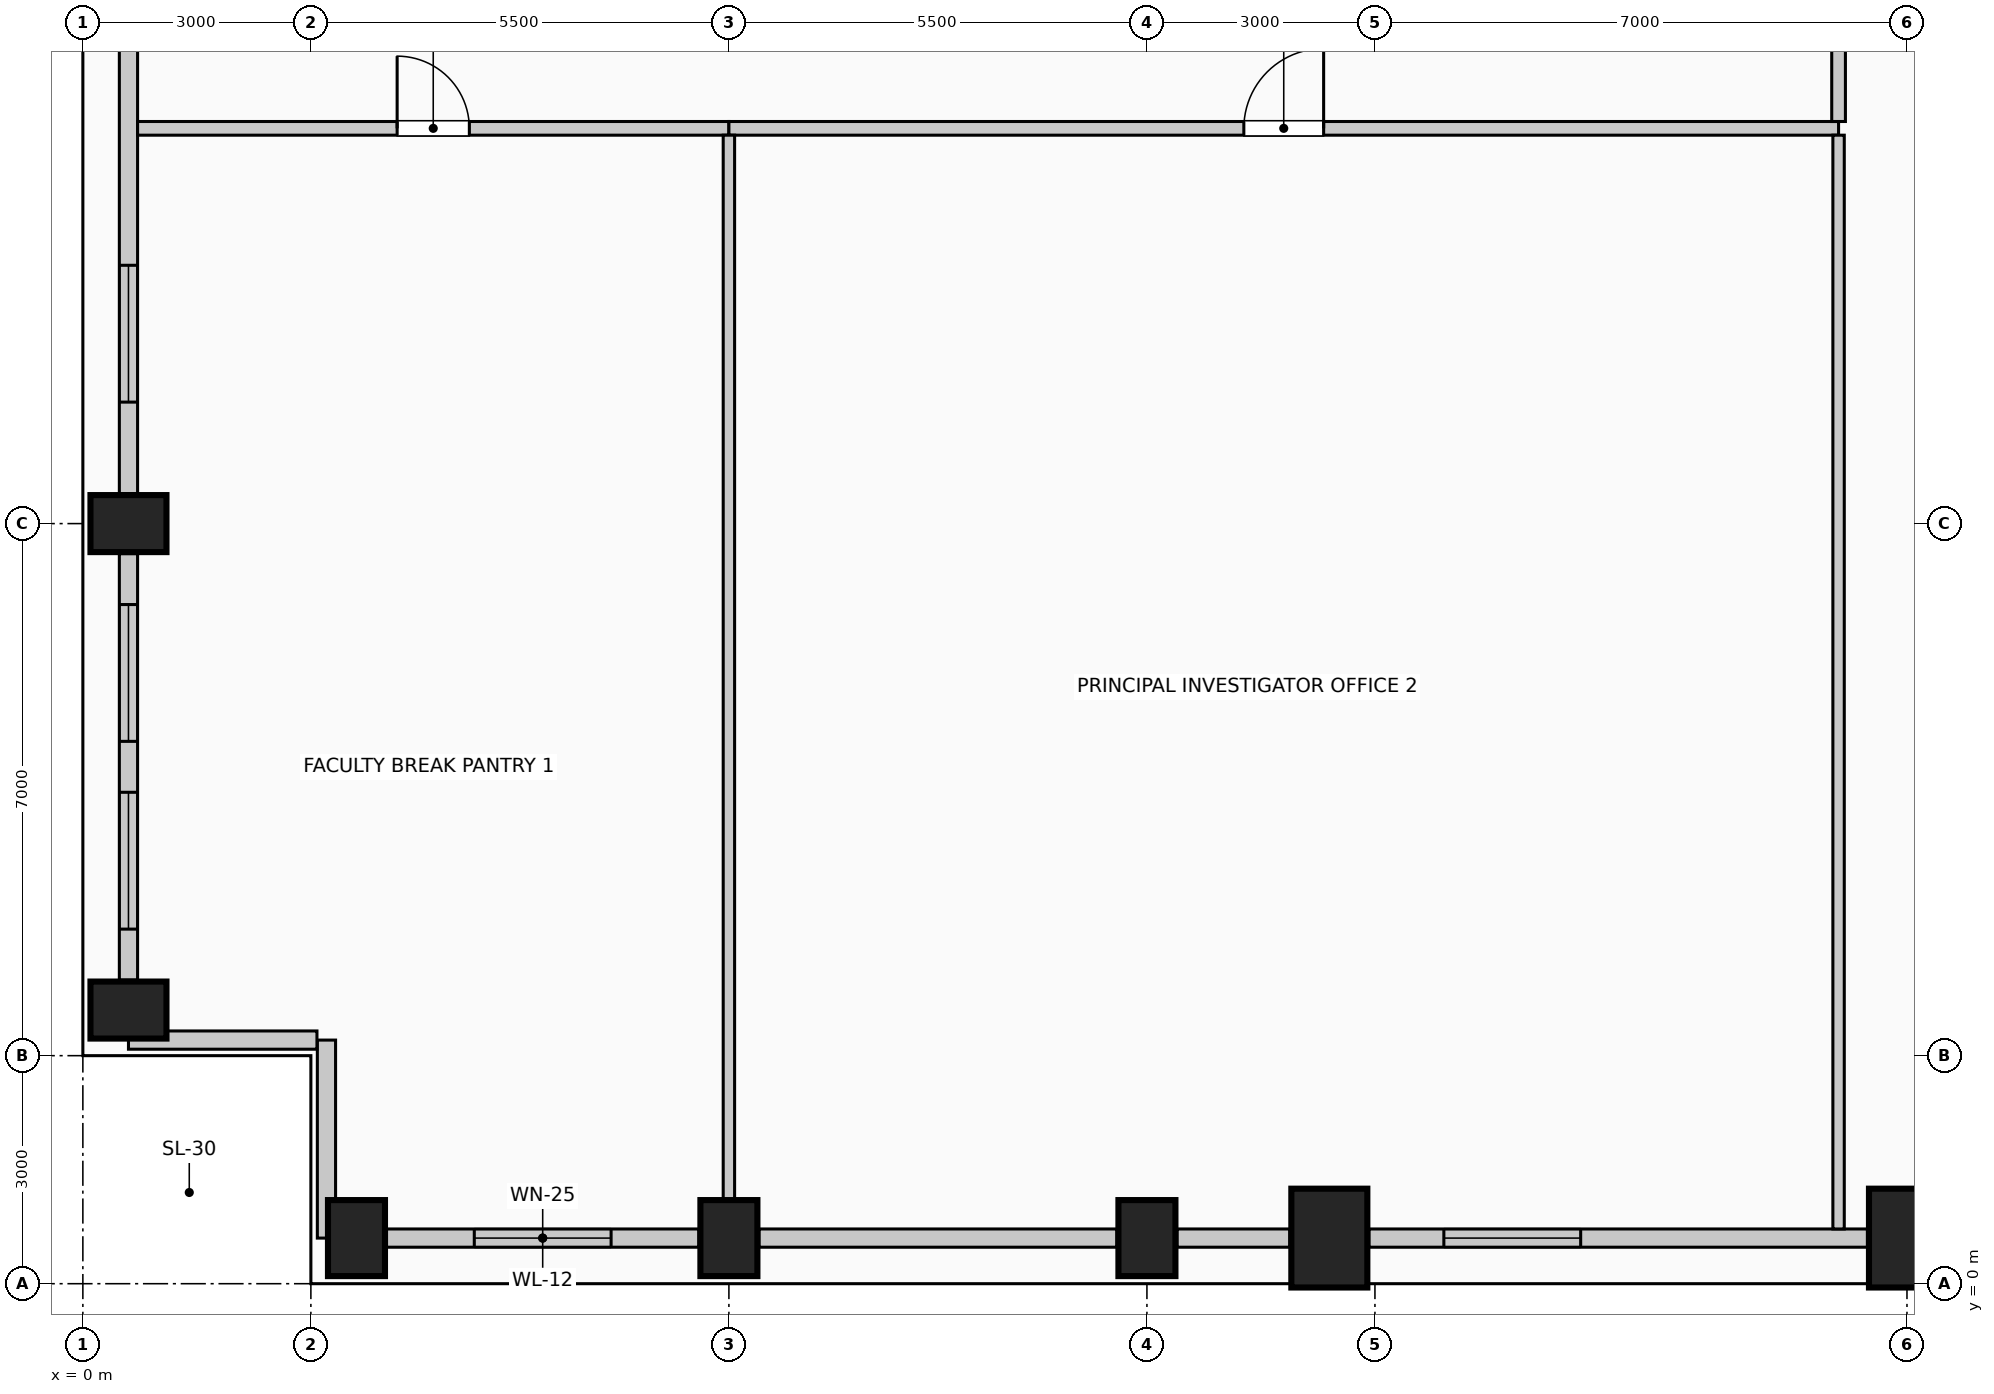
"""IFC4 building model, lengths in metres.
Left out: names, types, materials, properties, quantities, classifications, styles, units other than length and angle.
Written with IfcOpenShell. Run it as: python <this file> out.ifc"""

import sys

from ifc_helpers import new_model, si_unit, direction, frame, frame_2d, origin, origin_2d, place, context, subcontext, project, spatial, rectangle, extrude, element, fill, save


model = new_model("IFC4")
c1 = context("Model", 3, precision=1e-05, world=origin(), true_north=direction((0.0, 1.0)))
c2 = subcontext(c1, "Body", "Model", "MODEL_VIEW")
j1 = project(units=[si_unit("LENGTHUNIT", "METRE"), si_unit("PLANEANGLEUNIT", "RADIAN")], contexts=[c1])
p1 = place(None, origin())
s1 = spatial("IfcSite", under=j1, at=p1, CompositionType="ELEMENT")
p2 = place(p1, origin())
s2 = spatial("IfcBuilding", under=s1, at=p2, CompositionType="ELEMENT")
p3 = place(p2, frame((0.0, 0.0, 222.6)))
s3 = spatial("IfcBuildingStorey", under=s2, at=p3, CompositionType="ELEMENT", Elevation=222.6)
for number, where, z_axis, x_axis in (
    (1, (3.6, 0.6, 0.0), (0.0, 0.0, 1.0), (1.0, 0.0, 0.0)),
    (2, (8.5, 0.6, 0.0), (0.0, 0.0, 1.0), (1.0, 0.0, 0.0)),
    (3, (14.0, 0.6, 0.0), (0.0, 0.0, 1.0), (1.0, 0.0, 0.0)),
):
    element("IfcColumn", number, at=place(p3, frame(where, z_axis=z_axis, x_axis=x_axis)), inside=s3, PredefinedType="COLUMN", context=c2, shape_type="SweptSolid", body=[
        extrude(rectangle(XDim=0.75, YDim=1.0, at=origin_2d()), origin(), (0.0, 0.0, 1.0), 4.0),
    ])
for number, where, z_axis, x_axis in (
    (4, (16.4, 0.6, 0.0), (0.0, 0.0, 1.0), (1.0, 0.0, 0.0)),
    (5, (24.0, 0.6, 0.0), (0.0, 0.0, 1.0), (1.0, 0.0, 0.0)),
):
    element("IfcColumn", number, at=place(p3, frame(where, z_axis=z_axis, x_axis=x_axis)), inside=s3, PredefinedType="COLUMN", context=c2, shape_type="SweptSolid", body=[
        extrude(rectangle(XDim=1.0, YDim=1.3, at=origin_2d()), origin(), (0.0, 0.0, 1.0), 4.0),
    ])
for number, where, z_axis, x_axis in (
    (6, (0.6, 3.6, 0.0), (0.0, 0.0, 1.0), (0.0, 1.0, 0.0)),
    (7, (0.6, 10.0, 0.0), (0.0, 0.0, 1.0), (0.0, 1.0, 0.0)),
):
    element("IfcColumn", number, at=place(p3, frame(where, z_axis=z_axis, x_axis=x_axis)), inside=s3, PredefinedType="COLUMN", context=c2, shape_type="SweptSolid", body=[
        extrude(rectangle(XDim=0.75, YDim=1.0, at=origin_2d()), origin(), (0.0, 0.0, 1.0), 4.0),
    ])
p4 = place(p3, frame((8.105, 0.6, 0.0), z_axis=(0.0, 0.0, 1.0), x_axis=(-1.0, 0.0, 0.0)))
e8 = element("IfcWall", 8, at=p4, inside=s3, PredefinedType="SOLIDWALL", context=c2, shape_type="SweptSolid", body=[
    extrude(rectangle(XDim=4.11, YDim=0.24, at=frame_2d((2.055, 0.0))), origin(), (0.0, 0.0, 1.0), 3.0),
])
p5 = place(p4, frame((1.155, 0.0, 0.42)))
e9 = element("IfcOpeningElement", 9, at=p5, cuts=e8, PredefinedType="OPENING", context=c2, shape_type="SweptSolid", body=[
    extrude(rectangle(XDim=1.8, YDim=2.2, at=frame_2d((0.9, 1.1))), frame((0.0, 0.13, 0.0), z_axis=(0.0, -1.0, 0.0), x_axis=(1.0, 0.0, 0.0)), (0.0, 0.0, 1.0), 0.26),
])
p6 = place(p3, frame((13.605, 0.6, 0.0), z_axis=(0.0, 0.0, 1.0), x_axis=(-1.0, 0.0, 0.0)))
e10 = element("IfcWall", 10, at=p6, inside=s3, PredefinedType="SOLIDWALL", context=c2, shape_type="SweptSolid", body=[
    extrude(rectangle(XDim=4.71, YDim=0.24, at=frame_2d((2.355, 0.0))), origin(), (0.0, 0.0, 1.0), 3.0),
])
p7 = place(p3, frame((15.88, 0.6, 0.0), z_axis=(0.0, 0.0, 1.0), x_axis=(-1.0, 0.0, 0.0)))
e11 = element("IfcWall", 11, at=p7, inside=s3, PredefinedType="SOLIDWALL", context=c2, shape_type="SweptSolid", body=[
    extrude(rectangle(XDim=1.485, YDim=0.24, at=frame_2d((0.742, 0.0))), origin(), (0.0, 0.0, 1.0), 3.0),
])
p8 = place(p3, frame((23.48, 0.6, 0.0), z_axis=(0.0, 0.0, 1.0), x_axis=(-1.0, 0.0, 0.0)))
e12 = element("IfcWall", 12, at=p8, inside=s3, PredefinedType="SOLIDWALL", context=c2, shape_type="SweptSolid", body=[
    extrude(rectangle(XDim=6.56, YDim=0.24, at=frame_2d((3.28, 0.0))), origin(), (0.0, 0.0, 1.0), 3.0),
])
p9 = place(p8, frame((3.773, 0.0, 0.42)))
e13 = element("IfcOpeningElement", 13, at=p9, cuts=e12, PredefinedType="OPENING", context=c2, shape_type="SweptSolid", body=[
    extrude(rectangle(XDim=1.8, YDim=2.2, at=frame_2d((0.9, 1.1))), frame((0.0, 0.13, 0.0), z_axis=(0.0, -1.0, 0.0), x_axis=(1.0, 0.0, 0.0)), (0.0, 0.0, 1.0), 0.26),
])
p10 = place(p3, frame((0.6, 3.995, 0.0), z_axis=(0.0, 0.0, 1.0), x_axis=(0.0, 1.0, 0.0)))
e14 = element("IfcWall", 14, at=p10, inside=s3, PredefinedType="SOLIDWALL", context=c2, shape_type="SweptSolid", body=[
    extrude(rectangle(XDim=5.61, YDim=0.24, at=frame_2d((2.805, 0.0))), origin(), (0.0, 0.0, 1.0), 3.0),
])
p11 = place(p10, frame((0.67, 0.0, 0.42)))
e15 = element("IfcOpeningElement", 15, at=p11, cuts=e14, PredefinedType="OPENING", context=c2, shape_type="SweptSolid", body=[
    extrude(rectangle(XDim=1.8, YDim=2.2, at=frame_2d((0.9, 1.1))), frame((0.0, 0.13, 0.0), z_axis=(0.0, -1.0, 0.0), x_axis=(1.0, 0.0, 0.0)), (0.0, 0.0, 1.0), 0.26),
])
p12 = place(p10, frame((3.14, 0.0, 0.42)))
e16 = element("IfcOpeningElement", 16, at=p12, cuts=e14, PredefinedType="OPENING", context=c2, shape_type="SweptSolid", body=[
    extrude(rectangle(XDim=1.8, YDim=2.2, at=frame_2d((0.9, 1.1))), frame((0.0, 0.13, 0.0), z_axis=(0.0, -1.0, 0.0), x_axis=(1.0, 0.0, 0.0)), (0.0, 0.0, 1.0), 0.26),
])
p13 = place(p3, frame((0.6, 10.395, 0.0), z_axis=(0.0, 0.0, 1.0), x_axis=(0.0, 1.0, 0.0)))
e17 = element("IfcWall", 17, at=p13, inside=s3, PredefinedType="SOLIDWALL", context=c2, shape_type="SweptSolid", body=[
    extrude(rectangle(XDim=7.21, YDim=0.24, at=frame_2d((3.605, 0.0))), origin(), (0.0, 0.0, 1.0), 3.0),
])
p14 = place(p13, frame((1.203, 0.0, 0.42)))
e18 = element("IfcOpeningElement", 18, at=p14, cuts=e17, PredefinedType="OPENING", context=c2, shape_type="SweptSolid", body=[
    extrude(rectangle(XDim=1.8, YDim=2.2, at=frame_2d((0.9, 1.1))), frame((0.0, 0.13, 0.0), z_axis=(0.0, -1.0, 0.0), x_axis=(1.0, 0.0, 0.0)), (0.0, 0.0, 1.0), 0.26),
])
p15 = place(p3, frame((3.205, 0.6, 0.0), z_axis=(0.0, 0.0, 1.0), x_axis=(0.0, 1.0, 0.0)))
e19 = element("IfcWall", 19, at=p15, inside=s3, PredefinedType="SOLIDWALL", context=c2, shape_type="SweptSolid", body=[
    extrude(rectangle(XDim=2.605, YDim=0.24, at=frame_2d((1.302, 0.0))), origin(), (0.0, 0.0, 1.0), 3.75),
])
p16 = place(p3, frame((3.08, 3.205, 0.0), z_axis=(0.0, 0.0, 1.0), x_axis=(-1.0, 0.0, 0.0)))
e20 = element("IfcWall", 20, at=p16, inside=s3, PredefinedType="SOLIDWALL", context=c2, shape_type="SweptSolid", body=[
    extrude(rectangle(XDim=2.48, YDim=0.24, at=frame_2d((1.24, 0.0))), origin(), (0.0, 0.0, 1.0), 3.75),
])
p17 = place(p3, frame((0.72, 15.2, 0.0), z_axis=(0.0, 0.0, 1.0), x_axis=(1.0, 0.0, 0.0)))
e21 = element("IfcWall", 21, at=p17, inside=s3, PredefinedType="PARTITIONING", context=c2, shape_type="SweptSolid", body=[
    extrude(rectangle(XDim=7.78, YDim=0.18, at=frame_2d((3.89, 0.0))), origin(), (0.0, 0.0, 1.0), 3.75),
])
p18 = place(p17, frame((3.415, 0.0, 0.0)))
e22 = element("IfcOpeningElement", 22, at=p18, cuts=e21, PredefinedType="OPENING", context=c2, shape_type="SweptSolid", body=[
    extrude(rectangle(XDim=0.95, YDim=2.15, at=frame_2d((0.475, 1.075))), frame((0.0, 0.1, 0.0), z_axis=(0.0, -1.0, 0.0), x_axis=(1.0, 0.0, 0.0)), (0.0, 0.0, 1.0), 0.2),
])
p19 = place(p3, frame((8.5, 15.2, 0.0), z_axis=(0.0, 0.0, 1.0), x_axis=(1.0, 0.0, 0.0)))
e23 = element("IfcWall", 23, at=p19, inside=s3, PredefinedType="PARTITIONING", context=c2, shape_type="SweptSolid", body=[
    extrude(rectangle(XDim=14.6, YDim=0.18, at=frame_2d((7.3, 0.0))), origin(), (0.0, 0.0, 1.0), 3.75),
])
p20 = place(p19, frame((6.775, 0.0, 0.0)))
e24 = element("IfcOpeningElement", 24, at=p20, cuts=e23, PredefinedType="OPENING", context=c2, shape_type="SweptSolid", body=[
    extrude(rectangle(XDim=1.05, YDim=2.15, at=frame_2d((0.525, 1.075))), frame((0.0, 0.1, 0.0), z_axis=(0.0, -1.0, 0.0), x_axis=(1.0, 0.0, 0.0)), (0.0, 0.0, 1.0), 0.2),
])
p21 = place(p3, frame((8.5, 1.1, 0.0), z_axis=(0.0, 0.0, 1.0), x_axis=(0.0, 1.0, 0.0)))
e25 = element("IfcWall", 25, at=p21, inside=s3, PredefinedType="PARTITIONING", context=c2, shape_type="SweptSolid", body=[
    extrude(rectangle(XDim=14.01, YDim=0.15, at=frame_2d((7.005, 0.0))), origin(), (0.0, 0.0, 1.0), 3.75),
])
p22 = place(p3, frame((23.1, 0.72, 0.0), z_axis=(0.0, 0.0, 1.0), x_axis=(0.0, 1.0, 0.0)))
e26 = element("IfcWall", 26, at=p22, inside=s3, PredefinedType="PARTITIONING", context=c2, shape_type="SweptSolid", body=[
    extrude(rectangle(XDim=14.39, YDim=0.15, at=frame_2d((7.195, 0.0))), origin(), (0.0, 0.0, 1.0), 3.75),
])
p23 = place(p3, frame((23.1, 15.29, 0.0), z_axis=(0.0, 0.0, 1.0), x_axis=(0.0, 1.0, 0.0)))
e27 = element("IfcWall", 27, at=p23, inside=s3, PredefinedType="PARTITIONING", context=c2, shape_type="SweptSolid", body=[
    extrude(rectangle(XDim=2.01, YDim=0.18, at=frame_2d((1.005, 0.0))), origin(), (0.0, 0.0, 1.0), 3.75),
])
p24 = place(p5, origin())
e28 = element("IfcWindow", 28, at=p24, inside=s3, PartitioningType="SINGLE_PANEL", PredefinedType="WINDOW", context=c2, shape_type="SweptSolid", body=[
    extrude(rectangle(XDim=1.8, YDim=2.2, at=frame_2d((0.9, 1.1))), frame((0.0, 0.03, 0.0), z_axis=(0.0, -1.0, 0.0), x_axis=(1.0, 0.0, 0.0)), (0.0, 0.0, 1.0), 0.06),
])
fill(e9, e28)
p25 = place(p9, origin())
e29 = element("IfcWindow", 29, at=p25, inside=s3, PartitioningType="SINGLE_PANEL", PredefinedType="WINDOW", context=c2, shape_type="SweptSolid", body=[
    extrude(rectangle(XDim=1.8, YDim=2.2, at=frame_2d((0.9, 1.1))), frame((0.0, 0.03, 0.0), z_axis=(0.0, -1.0, 0.0), x_axis=(1.0, 0.0, 0.0)), (0.0, 0.0, 1.0), 0.06),
])
fill(e13, e29)
p26 = place(p11, origin())
e30 = element("IfcWindow", 30, at=p26, inside=s3, PartitioningType="SINGLE_PANEL", PredefinedType="WINDOW", context=c2, shape_type="SweptSolid", body=[
    extrude(rectangle(XDim=1.8, YDim=2.2, at=frame_2d((0.9, 1.1))), frame((0.0, 0.03, 0.0), z_axis=(0.0, -1.0, 0.0), x_axis=(1.0, 0.0, 0.0)), (0.0, 0.0, 1.0), 0.06),
])
fill(e15, e30)
p27 = place(p12, origin())
e31 = element("IfcWindow", 31, at=p27, inside=s3, PartitioningType="SINGLE_PANEL", PredefinedType="WINDOW", context=c2, shape_type="SweptSolid", body=[
    extrude(rectangle(XDim=1.8, YDim=2.2, at=frame_2d((0.9, 1.1))), frame((0.0, 0.03, 0.0), z_axis=(0.0, -1.0, 0.0), x_axis=(1.0, 0.0, 0.0)), (0.0, 0.0, 1.0), 0.06),
])
fill(e16, e31)
p28 = place(p14, origin())
e32 = element("IfcWindow", 32, at=p28, inside=s3, PartitioningType="SINGLE_PANEL", PredefinedType="WINDOW", context=c2, shape_type="SweptSolid", body=[
    extrude(rectangle(XDim=1.8, YDim=2.2, at=frame_2d((0.9, 1.1))), frame((0.0, 0.03, 0.0), z_axis=(0.0, -1.0, 0.0), x_axis=(1.0, 0.0, 0.0)), (0.0, 0.0, 1.0), 0.06),
])
fill(e18, e32)
p29 = place(p18, origin())
e33 = element("IfcDoor", 33, at=p29, inside=s3, OperationType="SINGLE_SWING_LEFT", PredefinedType="DOOR", context=c2, shape_type="SweptSolid", body=[
    extrude(rectangle(XDim=0.95, YDim=2.15, at=frame_2d((0.475, 1.075))), frame((0.0, 0.025, 0.0), z_axis=(0.0, -1.0, 0.0), x_axis=(1.0, 0.0, 0.0)), (0.0, 0.0, 1.0), 0.05),
])
fill(e22, e33)
p30 = place(p20, origin())
e34 = element("IfcDoor", 34, at=p30, inside=s3, OperationType="SINGLE_SWING_RIGHT", PredefinedType="DOOR", context=c2, shape_type="SweptSolid", body=[
    extrude(rectangle(XDim=1.05, YDim=2.15, at=frame_2d((0.525, 1.075))), frame((0.0, 0.025, 0.0), z_axis=(0.0, -1.0, 0.0), x_axis=(1.0, 0.0, 0.0)), (0.0, 0.0, 1.0), 0.05),
])
fill(e24, e34)
save(model, sys.argv[1])
